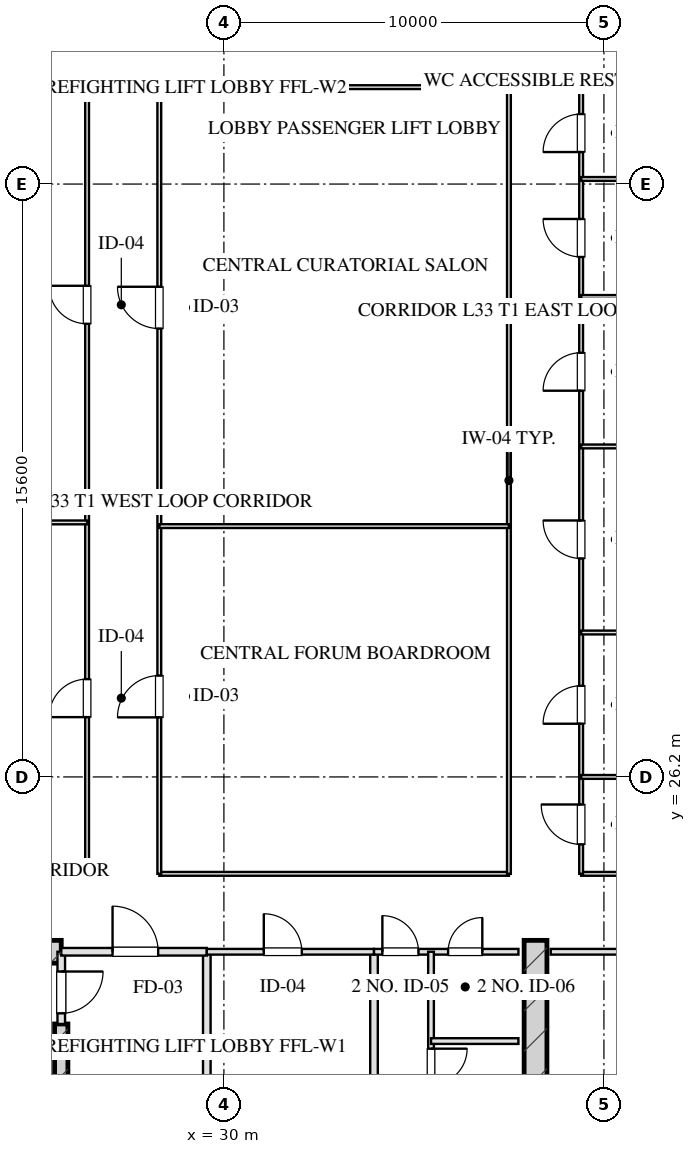
"""IFC4 building model, lengths in metres.
Left out: names, types, materials, properties, quantities, classifications, styles, units other than length and angle.
Written with IfcOpenShell. Run it as: python <this file> out.ifc"""

import sys

from ifc_helpers import new_model, si_unit, direction, frame, frame_2d, origin, place, context, subcontext, project, spatial, rectangle, extrude, element, fill, save


model = new_model("IFC4")
c1 = context("Model", 3, precision=1e-05, world=origin(), true_north=direction((0.0, 1.0)))
c2 = subcontext(c1, "Body", "Model", "MODEL_VIEW")
j1 = project(units=[si_unit("LENGTHUNIT", "METRE"), si_unit("PLANEANGLEUNIT", "RADIAN")], contexts=[c1])
p1 = place(None, origin())
s1 = spatial("IfcSite", under=j1, at=p1, CompositionType="ELEMENT")
p2 = place(p1, origin())
s2 = spatial("IfcBuilding", under=s1, at=p2, CompositionType="ELEMENT")
p3 = place(p2, frame((0.0, 0.0, 127.65)))
s3 = spatial("IfcBuildingStorey", under=s2, at=p3, CompositionType="ELEMENT", Elevation=127.65)
p4 = place(p3, frame((38.2, 21.9, 0.0), z_axis=(0.0, 0.0, 1.0), x_axis=(0.0, -1.0, 0.0)))
e1 = element("IfcWall", 1, at=p4, inside=s3, PredefinedType="SHEAR", context=c2, shape_type="SweptSolid", body=[
    extrude(rectangle(XDim=9.48, YDim=0.6, at=frame_2d((4.74, 0.0))), origin(), (0.0, 0.0, 1.0), 3.45),
])
p5 = place(p3, frame((25.72, 19.7, 0.0), z_axis=(0.0, 0.0, 1.0), x_axis=(0.0, -1.0, 0.0)))
e2 = element("IfcWall", 2, at=p5, inside=s3, PredefinedType="SHEAR", context=c2, shape_type="SweptSolid", body=[
    extrude(rectangle(XDim=6.98, YDim=0.35, at=frame_2d((3.49, 0.0))), origin(), (0.0, 0.0, 1.0), 3.45),
])
p6 = place(p3, frame((21.5, 21.6, 0.0), z_axis=(0.0, 0.0, 1.0), x_axis=(1.0, 0.0, 0.0)))
e3 = element("IfcWall", 3, at=p6, inside=s3, PredefinedType="SHEAR", context=c2, shape_type="SweptSolid", body=[
    extrude(rectangle(XDim=4.22, YDim=0.6, at=frame_2d((2.11, 0.0))), origin(), (0.0, 0.0, 1.0), 3.45),
])
p7 = place(p3, frame((25.72, 21.6, 0.0), z_axis=(0.0, 0.0, 1.0), x_axis=(0.0, -1.0, 0.0)))
e4 = element("IfcWall", 4, at=p7, inside=s3, PredefinedType="PARTITIONING", context=c2, shape_type="SweptSolid", body=[
    extrude(rectangle(XDim=1.9, YDim=0.2, at=frame_2d((0.95, 0.0))), origin(), (0.0, 0.0, 1.0), 3.175),
])
p8 = place(p7, frame((0.52, 0.0, 0.0)))
e5 = element("IfcOpeningElement", 5, at=p8, cuts=e4, PredefinedType="OPENING", context=c2, shape_type="SweptSolid", body=[
    extrude(rectangle(XDim=1.1, YDim=2.05, at=frame_2d((0.55, 1.025))), frame((0.0, 0.11, 0.0), z_axis=(0.0, -1.0, 0.0), x_axis=(1.0, 0.0, 0.0)), (0.0, 0.0, 1.0), 0.22),
])
p9 = place(p3, frame((29.55, 21.6, 0.0), z_axis=(0.0, 0.0, 1.0), x_axis=(0.0, -1.0, 0.0)))
e6 = element("IfcWall", 6, at=p9, inside=s3, PredefinedType="PARTITIONING", context=c2, shape_type="SweptSolid", body=[
    extrude(rectangle(XDim=8.43, YDim=0.2, at=frame_2d((4.215, 0.0))), origin(), (0.0, 0.0, 1.0), 3.175),
])
p10 = place(p3, frame((25.72, 21.6, 0.0), z_axis=(0.0, 0.0, 1.0), x_axis=(1.0, 0.0, 0.0)))
e7 = element("IfcWall", 7, at=p10, inside=s3, PredefinedType="PARTITIONING", context=c2, shape_type="SweptSolid", body=[
    extrude(rectangle(XDim=3.83, YDim=0.2, at=frame_2d((1.915, 0.0))), origin(), (0.0, 0.0, 1.0), 3.175),
])
p11 = place(p10, frame((1.35, 0.0, 0.0)))
e8 = element("IfcOpeningElement", 8, at=p11, cuts=e7, PredefinedType="OPENING", context=c2, shape_type="SweptSolid", body=[
    extrude(rectangle(XDim=1.2, YDim=2.05, at=frame_2d((0.6, 1.025))), frame((0.0, 0.11, 0.0), z_axis=(0.0, -1.0, 0.0), x_axis=(1.0, 0.0, 0.0)), (0.0, 0.0, 1.0), 0.22),
])
p12 = place(p3, frame((33.95, 21.6, 0.0), z_axis=(0.0, 0.0, 1.0), x_axis=(0.0, -1.0, 0.0)))
e9 = element("IfcWall", 9, at=p12, inside=s3, PredefinedType="PARTITIONING", context=c2, shape_type="SweptSolid", body=[
    extrude(rectangle(XDim=8.43, YDim=0.2, at=frame_2d((4.215, 0.0))), origin(), (0.0, 0.0, 1.0), 3.175),
])
p13 = place(p3, frame((29.55, 21.6, 0.0), z_axis=(0.0, 0.0, 1.0), x_axis=(1.0, 0.0, 0.0)))
e10 = element("IfcWall", 10, at=p13, inside=s3, PredefinedType="PARTITIONING", context=c2, shape_type="SweptSolid", body=[
    extrude(rectangle(XDim=4.4, YDim=0.15, at=frame_2d((2.2, 0.0))), origin(), (0.0, 0.0, 1.0), 3.175),
])
p14 = place(p13, frame((1.5, 0.0, 0.0)))
e11 = element("IfcOpeningElement", 11, at=p14, cuts=e10, PredefinedType="OPENING", context=c2, shape_type="SweptSolid", body=[
    extrude(rectangle(XDim=1.0, YDim=2.05, at=frame_2d((0.5, 1.025))), frame((0.0, 0.085, 0.0), z_axis=(0.0, -1.0, 0.0), x_axis=(1.0, 0.0, 0.0)), (0.0, 0.0, 1.0), 0.17),
])
p15 = place(p3, frame((33.95, 21.6, 0.0), z_axis=(0.0, 0.0, 1.0), x_axis=(1.0, 0.0, 0.0)))
e12 = element("IfcWall", 12, at=p15, inside=s3, PredefinedType="PARTITIONING", context=c2, shape_type="SweptSolid", body=[
    extrude(rectangle(XDim=3.8, YDim=0.15, at=frame_2d((1.9, 0.0))), origin(), (0.0, 0.0, 1.0), 3.175),
])
p16 = place(p15, frame((0.22, 0.0, 0.0)))
e13 = element("IfcOpeningElement", 13, at=p16, cuts=e12, PredefinedType="OPENING", context=c2, shape_type="SweptSolid", body=[
    extrude(rectangle(XDim=0.95, YDim=2.05, at=frame_2d((0.475, 1.025))), frame((0.0, 0.085, 0.0), z_axis=(0.0, -1.0, 0.0), x_axis=(1.0, 0.0, 0.0)), (0.0, 0.0, 1.0), 0.17),
])
p17 = place(p15, frame((1.95, 0.0, 0.0)))
e14 = element("IfcOpeningElement", 14, at=p17, cuts=e12, PredefinedType="OPENING", context=c2, shape_type="SweptSolid", body=[
    extrude(rectangle(XDim=0.9, YDim=2.05, at=frame_2d((0.45, 1.025))), frame((0.0, 0.085, 0.0), z_axis=(0.0, -1.0, 0.0), x_axis=(1.0, 0.0, 0.0)), (0.0, 0.0, 1.0), 0.17),
])
p18 = place(p3, frame((35.45, 21.6, 0.0), z_axis=(0.0, 0.0, 1.0), x_axis=(0.0, -1.0, 0.0)))
e15 = element("IfcWall", 15, at=p18, inside=s3, PredefinedType="PARTITIONING", context=c2, shape_type="SweptSolid", body=[
    extrude(rectangle(XDim=8.43, YDim=0.15, at=frame_2d((4.215, 0.0))), origin(), (0.0, 0.0, 1.0), 2.815),
])
p19 = place(p18, frame((2.55, 0.0, 0.0)))
e16 = element("IfcOpeningElement", 16, at=p19, cuts=e15, PredefinedType="OPENING", context=c2, shape_type="SweptSolid", body=[
    extrude(rectangle(XDim=0.95, YDim=2.05, at=frame_2d((0.475, 1.025))), frame((0.0, 0.085, 0.0), z_axis=(0.0, -1.0, 0.0), x_axis=(1.0, 0.0, 0.0)), (0.0, 0.0, 1.0), 0.17),
])
p20 = place(p18, frame((5.6, 0.0, 0.0)))
e17 = element("IfcOpeningElement", 17, at=p20, cuts=e15, PredefinedType="OPENING", context=c2, shape_type="SweptSolid", body=[
    extrude(rectangle(XDim=0.9, YDim=2.05, at=frame_2d((0.45, 1.025))), frame((0.0, 0.085, 0.0), z_axis=(0.0, -1.0, 0.0), x_axis=(1.0, 0.0, 0.0)), (0.0, 0.0, 1.0), 0.17),
])
p21 = place(p3, frame((35.45, 19.25, 0.0), z_axis=(0.0, 0.0, 1.0), x_axis=(1.0, 0.0, 0.0)))
e18 = element("IfcWall", 18, at=p21, inside=s3, PredefinedType="PARTITIONING", context=c2, shape_type="SweptSolid", body=[
    extrude(rectangle(XDim=2.3, YDim=0.15, at=frame_2d((1.15, 0.0))), origin(), (0.0, 0.0, 1.0), 3.175),
])
p22 = place(p3, frame((38.6, 21.6, 0.0), z_axis=(0.0, 0.0, 1.0), x_axis=(1.0, 0.0, 0.0)))
e19 = element("IfcWall", 19, at=p22, inside=s3, PredefinedType="PARTITIONING", context=c2, shape_type="SweptSolid", body=[
    extrude(rectangle(XDim=10.0, YDim=0.15, at=frame_2d((5.0, 0.0))), origin(), (0.0, 0.0, 1.0), 3.175),
])
p23 = place(p22, frame((4.2, 0.0, 0.0)))
e20 = element("IfcOpeningElement", 20, at=p23, cuts=e19, PredefinedType="OPENING", context=c2, shape_type="SweptSolid", body=[
    extrude(rectangle(XDim=1.05, YDim=2.05, at=frame_2d((0.525, 1.025))), frame((0.0, 0.085, 0.0), z_axis=(0.0, -1.0, 0.0), x_axis=(1.0, 0.0, 0.0)), (0.0, 0.0, 1.0), 0.17),
])
p24 = place(p3, frame((11.4, 23.65, 0.0), z_axis=(0.0, 0.0, 1.0), x_axis=(1.0, 0.0, 0.0)))
e21 = element("IfcWall", 21, at=p24, inside=s3, PredefinedType="MOVABLE", context=c2, shape_type="SweptSolid", body=[
    extrude(rectangle(XDim=15.0, YDim=0.1, at=frame_2d((7.5, 0.0))), origin(), (0.0, 0.0, 1.0), 3.175),
])
p25 = place(p3, frame((28.3, 23.65, 0.0), z_axis=(0.0, 0.0, 1.0), x_axis=(1.0, 0.0, 0.0)))
e22 = element("IfcWall", 22, at=p25, inside=s3, PredefinedType="MOVABLE", context=c2, shape_type="SweptSolid", body=[
    extrude(rectangle(XDim=9.2, YDim=0.1, at=frame_2d((4.6, 0.0))), origin(), (0.0, 0.0, 1.0), 3.175),
])
p26 = place(p3, frame((39.4, 23.65, 0.0), z_axis=(0.0, 0.0, 1.0), x_axis=(1.0, 0.0, 0.0)))
e23 = element("IfcWall", 23, at=p26, inside=s3, PredefinedType="MOVABLE", context=c2, shape_type="SweptSolid", body=[
    extrude(rectangle(XDim=9.2, YDim=0.1, at=frame_2d((4.6, 0.0))), origin(), (0.0, 0.0, 1.0), 3.175),
])
p27 = place(p3, frame((11.4, 44.35, 0.0), z_axis=(0.0, 0.0, 1.0), x_axis=(1.0, 0.0, 0.0)))
e24 = element("IfcWall", 24, at=p27, inside=s3, PredefinedType="MOVABLE", context=c2, shape_type="SweptSolid", body=[
    extrude(rectangle(XDim=15.0, YDim=0.1, at=frame_2d((7.5, 0.0))), origin(), (0.0, 0.0, 1.0), 3.175),
])
p28 = place(p3, frame((28.3, 44.35, 0.0), z_axis=(0.0, 0.0, 1.0), x_axis=(1.0, 0.0, 0.0)))
e25 = element("IfcWall", 25, at=p28, inside=s3, PredefinedType="MOVABLE", context=c2, shape_type="SweptSolid", body=[
    extrude(rectangle(XDim=9.2, YDim=0.1, at=frame_2d((4.6, 0.0))), origin(), (0.0, 0.0, 1.0), 3.175),
])
p29 = place(p3, frame((39.4, 44.35, 0.0), z_axis=(0.0, 0.0, 1.0), x_axis=(1.0, 0.0, 0.0)))
e26 = element("IfcWall", 26, at=p29, inside=s3, PredefinedType="MOVABLE", context=c2, shape_type="SweptSolid", body=[
    extrude(rectangle(XDim=9.2, YDim=0.1, at=frame_2d((4.6, 0.0))), origin(), (0.0, 0.0, 1.0), 3.175),
])
p30 = place(p3, frame((26.4, 23.65, 0.0), z_axis=(0.0, 0.0, 1.0), x_axis=(0.0, 1.0, 0.0)))
e27 = element("IfcWall", 27, at=p30, inside=s3, PredefinedType="MOVABLE", context=c2, shape_type="SweptSolid", body=[
    extrude(rectangle(XDim=20.7, YDim=0.1, at=frame_2d((10.35, 0.0))), origin(), (0.0, 0.0, 1.0), 3.175),
])
p31 = place(p30, frame((4.124, 0.0, 0.0)))
e28 = element("IfcOpeningElement", 28, at=p31, cuts=e27, PredefinedType="OPENING", context=c2, shape_type="SweptSolid", body=[
    extrude(rectangle(XDim=1.0, YDim=2.05, at=frame_2d((0.5, 1.025))), frame((0.0, 0.06, 0.0), z_axis=(0.0, -1.0, 0.0), x_axis=(1.0, 0.0, 0.0)), (0.0, 0.0, 1.0), 0.12),
])
p32 = place(p30, frame((14.473, 0.0, 0.0)))
e29 = element("IfcOpeningElement", 29, at=p32, cuts=e27, PredefinedType="OPENING", context=c2, shape_type="SweptSolid", body=[
    extrude(rectangle(XDim=1.0, YDim=2.05, at=frame_2d((0.5, 1.025))), frame((0.0, 0.06, 0.0), z_axis=(0.0, -1.0, 0.0), x_axis=(1.0, 0.0, 0.0)), (0.0, 0.0, 1.0), 0.12),
])
p33 = place(p3, frame((28.3, 23.65, 0.0), z_axis=(0.0, 0.0, 1.0), x_axis=(0.0, 1.0, 0.0)))
e30 = element("IfcWall", 30, at=p33, inside=s3, PredefinedType="MOVABLE", context=c2, shape_type="SweptSolid", body=[
    extrude(rectangle(XDim=20.7, YDim=0.1, at=frame_2d((10.35, 0.0))), origin(), (0.0, 0.0, 1.0), 3.175),
])
p34 = place(p33, frame((4.117, 0.0, 0.0)))
e31 = element("IfcOpeningElement", 31, at=p34, cuts=e30, PredefinedType="OPENING", context=c2, shape_type="SweptSolid", body=[
    extrude(rectangle(XDim=1.1, YDim=2.05, at=frame_2d((0.55, 1.025))), frame((0.0, 0.06, 0.0), z_axis=(0.0, -1.0, 0.0), x_axis=(1.0, 0.0, 0.0)), (0.0, 0.0, 1.0), 0.12),
])
p35 = place(p33, frame((14.347, 0.0, 0.0)))
e32 = element("IfcOpeningElement", 32, at=p35, cuts=e30, PredefinedType="OPENING", context=c2, shape_type="SweptSolid", body=[
    extrude(rectangle(XDim=1.1, YDim=2.05, at=frame_2d((0.55, 1.025))), frame((0.0, 0.06, 0.0), z_axis=(0.0, -1.0, 0.0), x_axis=(1.0, 0.0, 0.0)), (0.0, 0.0, 1.0), 0.12),
])
p36 = place(p3, frame((37.5, 23.65, 0.0), z_axis=(0.0, 0.0, 1.0), x_axis=(0.0, 1.0, 0.0)))
e33 = element("IfcWall", 33, at=p36, inside=s3, PredefinedType="MOVABLE", context=c2, shape_type="SweptSolid", body=[
    extrude(rectangle(XDim=20.7, YDim=0.1, at=frame_2d((10.35, 0.0))), origin(), (0.0, 0.0, 1.0), 3.175),
])
p37 = place(p3, frame((39.4, 23.65, 0.0), z_axis=(0.0, 0.0, 1.0), x_axis=(0.0, 1.0, 0.0)))
e34 = element("IfcWall", 34, at=p37, inside=s3, PredefinedType="MOVABLE", context=c2, shape_type="SweptSolid", body=[
    extrude(rectangle(XDim=20.7, YDim=0.1, at=frame_2d((10.35, 0.0))), origin(), (0.0, 0.0, 1.0), 3.175),
])
p38 = place(p37, frame((0.775, 0.0, 0.0)))
e35 = element("IfcOpeningElement", 35, at=p38, cuts=e34, PredefinedType="OPENING", context=c2, shape_type="SweptSolid", body=[
    extrude(rectangle(XDim=1.05, YDim=2.05, at=frame_2d((0.525, 1.025))), frame((0.0, 0.06, 0.0), z_axis=(0.0, -1.0, 0.0), x_axis=(1.0, 0.0, 0.0)), (0.0, 0.0, 1.0), 0.12),
])
p39 = place(p37, frame((3.95, 0.0, 0.0)))
e36 = element("IfcOpeningElement", 36, at=p39, cuts=e34, PredefinedType="OPENING", context=c2, shape_type="SweptSolid", body=[
    extrude(rectangle(XDim=1.0, YDim=2.05, at=frame_2d((0.5, 1.025))), frame((0.0, 0.06, 0.0), z_axis=(0.0, -1.0, 0.0), x_axis=(1.0, 0.0, 0.0)), (0.0, 0.0, 1.0), 0.12),
])
p40 = place(p37, frame((8.298, 0.0, 0.0)))
e37 = element("IfcOpeningElement", 37, at=p40, cuts=e34, PredefinedType="OPENING", context=c2, shape_type="SweptSolid", body=[
    extrude(rectangle(XDim=1.0, YDim=2.05, at=frame_2d((0.5, 1.025))), frame((0.0, 0.06, 0.0), z_axis=(0.0, -1.0, 0.0), x_axis=(1.0, 0.0, 0.0)), (0.0, 0.0, 1.0), 0.12),
])
p41 = place(p37, frame((12.712, 0.0, 0.0)))
e38 = element("IfcOpeningElement", 38, at=p41, cuts=e34, PredefinedType="OPENING", context=c2, shape_type="SweptSolid", body=[
    extrude(rectangle(XDim=1.0, YDim=2.05, at=frame_2d((0.5, 1.025))), frame((0.0, 0.06, 0.0), z_axis=(0.0, -1.0, 0.0), x_axis=(1.0, 0.0, 0.0)), (0.0, 0.0, 1.0), 0.12),
])
p42 = place(p37, frame((16.231, 0.0, 0.0)))
e39 = element("IfcOpeningElement", 39, at=p42, cuts=e34, PredefinedType="OPENING", context=c2, shape_type="SweptSolid", body=[
    extrude(rectangle(XDim=1.0, YDim=2.05, at=frame_2d((0.5, 1.025))), frame((0.0, 0.06, 0.0), z_axis=(0.0, -1.0, 0.0), x_axis=(1.0, 0.0, 0.0)), (0.0, 0.0, 1.0), 0.12),
])
p43 = place(p37, frame((18.992, 0.0, 0.0)))
e40 = element("IfcOpeningElement", 40, at=p43, cuts=e34, PredefinedType="OPENING", context=c2, shape_type="SweptSolid", body=[
    extrude(rectangle(XDim=1.0, YDim=2.05, at=frame_2d((0.5, 1.025))), frame((0.0, 0.06, 0.0), z_axis=(0.0, -1.0, 0.0), x_axis=(1.0, 0.0, 0.0)), (0.0, 0.0, 1.0), 0.12),
])
p44 = place(p3, frame((28.3, 32.8, 0.0), z_axis=(0.0, 0.0, 1.0), x_axis=(1.0, 0.0, 0.0)))
e41 = element("IfcWall", 41, at=p44, inside=s3, PredefinedType="MOVABLE", context=c2, shape_type="SweptSolid", body=[
    extrude(rectangle(XDim=9.2, YDim=0.1, at=frame_2d((4.6, 0.0))), origin(), (0.0, 0.0, 1.0), 3.175),
])
p45 = place(p3, frame((11.4, 32.897, 0.0), z_axis=(0.0, 0.0, 1.0), x_axis=(1.0, 0.0, 0.0)))
e42 = element("IfcWall", 42, at=p45, inside=s3, PredefinedType="MOVABLE", context=c2, shape_type="SweptSolid", body=[
    extrude(rectangle(XDim=15.0, YDim=0.1, at=frame_2d((7.5, 0.0))), origin(), (0.0, 0.0, 1.0), 3.175),
])
for number, where, z_axis, x_axis in (
    (43, (39.4, 26.2, 0.0), (0.0, 0.0, 1.0), (1.0, 0.0, 0.0)),
    (44, (39.4, 30.0, 0.0), (0.0, 0.0, 1.0), (1.0, 0.0, 0.0)),
    (45, (39.4, 34.896, 0.0), (0.0, 0.0, 1.0), (1.0, 0.0, 0.0)),
    (46, (39.4, 38.829, 0.0), (0.0, 0.0, 1.0), (1.0, 0.0, 0.0)),
    (47, (39.4, 41.934, 0.0), (0.0, 0.0, 1.0), (1.0, 0.0, 0.0)),
):
    element("IfcWall", number, at=place(p3, frame(where, z_axis=z_axis, x_axis=x_axis)), inside=s3, PredefinedType="MOVABLE", context=c2, shape_type="SweptSolid", body=[
        extrude(rectangle(XDim=9.2, YDim=0.1, at=frame_2d((4.6, 0.0))), origin(), (0.0, 0.0, 1.0), 3.175),
    ])
p46 = place(p8, origin())
e48 = element("IfcDoor", 48, at=p46, inside=s3, OperationType="SINGLE_SWING_LEFT", PredefinedType="DOOR", context=c2, shape_type="SweptSolid", body=[
    extrude(rectangle(XDim=1.1, YDim=2.05, at=frame_2d((0.55, 1.025))), frame((0.0, 0.025, 0.0), z_axis=(0.0, -1.0, 0.0), x_axis=(1.0, 0.0, 0.0)), (0.0, 0.0, 1.0), 0.05),
])
fill(e5, e48)
p47 = place(p11, origin())
e49 = element("IfcDoor", 49, at=p47, inside=s3, OperationType="SINGLE_SWING_LEFT", PredefinedType="DOOR", context=c2, shape_type="SweptSolid", body=[
    extrude(rectangle(XDim=1.2, YDim=2.05, at=frame_2d((0.6, 1.025))), frame((0.0, 0.025, 0.0), z_axis=(0.0, -1.0, 0.0), x_axis=(1.0, 0.0, 0.0)), (0.0, 0.0, 1.0), 0.05),
])
fill(e8, e49)
p48 = place(p14, origin())
e50 = element("IfcDoor", 50, at=p48, inside=s3, OperationType="SINGLE_SWING_LEFT", PredefinedType="DOOR", context=c2, shape_type="SweptSolid", body=[
    extrude(rectangle(XDim=1.0, YDim=2.05, at=frame_2d((0.5, 1.025))), frame((0.0, 0.025, 0.0), z_axis=(0.0, -1.0, 0.0), x_axis=(1.0, 0.0, 0.0)), (0.0, 0.0, 1.0), 0.05),
])
fill(e11, e50)
p49 = place(p16, origin())
e51 = element("IfcDoor", 51, at=p49, inside=s3, OperationType="SINGLE_SWING_LEFT", PredefinedType="DOOR", context=c2, shape_type="SweptSolid", body=[
    extrude(rectangle(XDim=0.95, YDim=2.05, at=frame_2d((0.475, 1.025))), frame((0.0, 0.025, 0.0), z_axis=(0.0, -1.0, 0.0), x_axis=(1.0, 0.0, 0.0)), (0.0, 0.0, 1.0), 0.05),
])
fill(e13, e51)
p50 = place(p17, origin())
e52 = element("IfcDoor", 52, at=p50, inside=s3, OperationType="SINGLE_SWING_RIGHT", PredefinedType="DOOR", context=c2, shape_type="SweptSolid", body=[
    extrude(rectangle(XDim=0.9, YDim=2.05, at=frame_2d((0.45, 1.025))), frame((0.0, 0.025, 0.0), z_axis=(0.0, -1.0, 0.0), x_axis=(1.0, 0.0, 0.0)), (0.0, 0.0, 1.0), 0.05),
])
fill(e14, e52)
p51 = place(p19, origin())
e53 = element("IfcDoor", 53, at=p51, inside=s3, OperationType="SINGLE_SWING_LEFT", PredefinedType="DOOR", context=c2, shape_type="SweptSolid", body=[
    extrude(rectangle(XDim=0.95, YDim=2.05, at=frame_2d((0.475, 1.025))), frame((0.0, 0.025, 0.0), z_axis=(0.0, -1.0, 0.0), x_axis=(1.0, 0.0, 0.0)), (0.0, 0.0, 1.0), 0.05),
])
fill(e16, e53)
p52 = place(p31, origin())
e54 = element("IfcDoor", 54, at=p52, inside=s3, OperationType="SINGLE_SWING_LEFT", PredefinedType="DOOR", context=c2, shape_type="SweptSolid", body=[
    extrude(rectangle(XDim=1.0, YDim=2.05, at=frame_2d((0.5, 1.025))), frame((0.0, 0.025, 0.0), z_axis=(0.0, -1.0, 0.0), x_axis=(1.0, 0.0, 0.0)), (0.0, 0.0, 1.0), 0.05),
])
fill(e28, e54)
p53 = place(p32, origin())
e55 = element("IfcDoor", 55, at=p53, inside=s3, OperationType="SINGLE_SWING_RIGHT", PredefinedType="DOOR", context=c2, shape_type="SweptSolid", body=[
    extrude(rectangle(XDim=1.0, YDim=2.05, at=frame_2d((0.5, 1.025))), frame((0.0, 0.025, 0.0), z_axis=(0.0, -1.0, 0.0), x_axis=(1.0, 0.0, 0.0)), (0.0, 0.0, 1.0), 0.05),
])
fill(e29, e55)
p54 = place(p34, origin())
e56 = element("IfcDoor", 56, at=p54, inside=s3, OperationType="SINGLE_SWING_LEFT", PredefinedType="DOOR", context=c2, shape_type="SweptSolid", body=[
    extrude(rectangle(XDim=1.1, YDim=2.05, at=frame_2d((0.55, 1.025))), frame((0.0, 0.025, 0.0), z_axis=(0.0, -1.0, 0.0), x_axis=(1.0, 0.0, 0.0)), (0.0, 0.0, 1.0), 0.05),
])
fill(e31, e56)
p55 = place(p35, origin())
e57 = element("IfcDoor", 57, at=p55, inside=s3, OperationType="SINGLE_SWING_RIGHT", PredefinedType="DOOR", context=c2, shape_type="SweptSolid", body=[
    extrude(rectangle(XDim=1.1, YDim=2.05, at=frame_2d((0.55, 1.025))), frame((0.0, 0.025, 0.0), z_axis=(0.0, -1.0, 0.0), x_axis=(1.0, 0.0, 0.0)), (0.0, 0.0, 1.0), 0.05),
])
fill(e32, e57)
p56 = place(p38, origin())
e58 = element("IfcDoor", 58, at=p56, inside=s3, OperationType="SINGLE_SWING_RIGHT", PredefinedType="DOOR", context=c2, shape_type="SweptSolid", body=[
    extrude(rectangle(XDim=1.05, YDim=2.05, at=frame_2d((0.525, 1.025))), frame((0.0, 0.025, 0.0), z_axis=(0.0, -1.0, 0.0), x_axis=(1.0, 0.0, 0.0)), (0.0, 0.0, 1.0), 0.05),
])
fill(e35, e58)
p57 = place(p39, origin())
e59 = element("IfcDoor", 59, at=p57, inside=s3, OperationType="SINGLE_SWING_LEFT", PredefinedType="DOOR", context=c2, shape_type="SweptSolid", body=[
    extrude(rectangle(XDim=1.0, YDim=2.05, at=frame_2d((0.5, 1.025))), frame((0.0, 0.025, 0.0), z_axis=(0.0, -1.0, 0.0), x_axis=(1.0, 0.0, 0.0)), (0.0, 0.0, 1.0), 0.05),
])
fill(e36, e59)
p58 = place(p40, origin())
e60 = element("IfcDoor", 60, at=p58, inside=s3, OperationType="SINGLE_SWING_RIGHT", PredefinedType="DOOR", context=c2, shape_type="SweptSolid", body=[
    extrude(rectangle(XDim=1.0, YDim=2.05, at=frame_2d((0.5, 1.025))), frame((0.0, 0.025, 0.0), z_axis=(0.0, -1.0, 0.0), x_axis=(1.0, 0.0, 0.0)), (0.0, 0.0, 1.0), 0.05),
])
fill(e37, e60)
p59 = place(p41, origin())
e61 = element("IfcDoor", 61, at=p59, inside=s3, OperationType="SINGLE_SWING_LEFT", PredefinedType="DOOR", context=c2, shape_type="SweptSolid", body=[
    extrude(rectangle(XDim=1.0, YDim=2.05, at=frame_2d((0.5, 1.025))), frame((0.0, 0.025, 0.0), z_axis=(0.0, -1.0, 0.0), x_axis=(1.0, 0.0, 0.0)), (0.0, 0.0, 1.0), 0.05),
])
fill(e38, e61)
p60 = place(p42, origin())
e62 = element("IfcDoor", 62, at=p60, inside=s3, OperationType="SINGLE_SWING_RIGHT", PredefinedType="DOOR", context=c2, shape_type="SweptSolid", body=[
    extrude(rectangle(XDim=1.0, YDim=2.05, at=frame_2d((0.5, 1.025))), frame((0.0, 0.025, 0.0), z_axis=(0.0, -1.0, 0.0), x_axis=(1.0, 0.0, 0.0)), (0.0, 0.0, 1.0), 0.05),
])
fill(e39, e62)
p61 = place(p43, origin())
e63 = element("IfcDoor", 63, at=p61, inside=s3, OperationType="SINGLE_SWING_LEFT", PredefinedType="DOOR", context=c2, shape_type="SweptSolid", body=[
    extrude(rectangle(XDim=1.0, YDim=2.05, at=frame_2d((0.5, 1.025))), frame((0.0, 0.025, 0.0), z_axis=(0.0, -1.0, 0.0), x_axis=(1.0, 0.0, 0.0)), (0.0, 0.0, 1.0), 0.05),
])
fill(e40, e63)
save(model, sys.argv[1])
